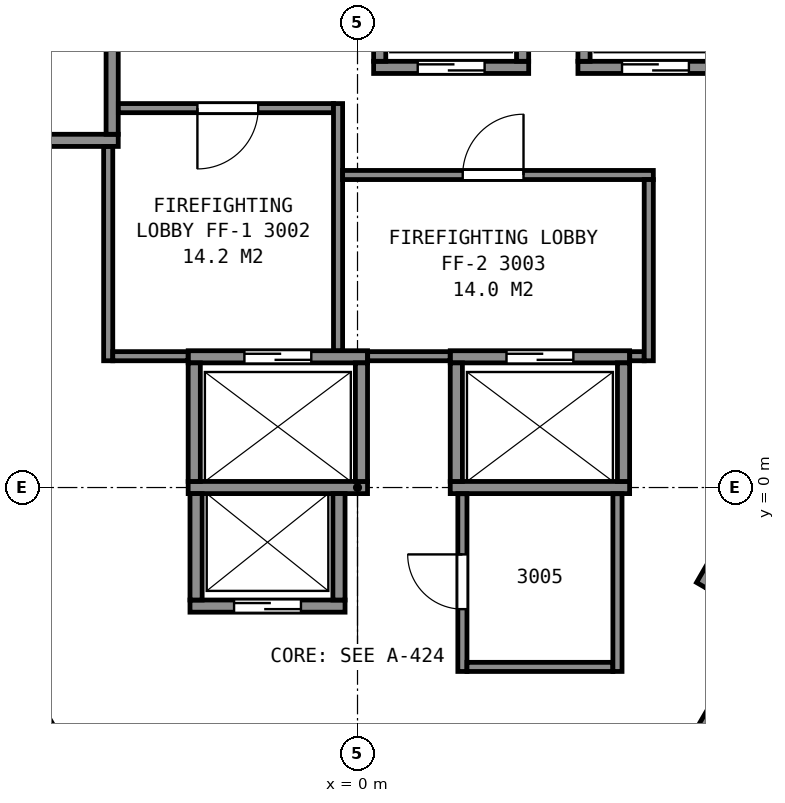
"""IFC4 building model, lengths in metres.
Left out: names, types, materials, properties, quantities, classifications, styles, units other than length and angle.
Written with IfcOpenShell. Run it as: python <this file> out.ifc"""

import sys

from ifc_helpers import new_model, si_unit, direction, frame, frame_2d, origin, place, context, subcontext, project, spatial, rectangle, extrude, element, fill, save


model = new_model("IFC4")
c1 = context("Model", 3, precision=1e-05, world=origin(), true_north=direction((0.0, 1.0)))
c2 = subcontext(c1, "Body", "Model", "MODEL_VIEW")
j1 = project(units=[si_unit("LENGTHUNIT", "METRE"), si_unit("PLANEANGLEUNIT", "RADIAN")], contexts=[c1])
p1 = place(None, origin())
s1 = spatial("IfcSite", under=j1, at=p1, CompositionType="ELEMENT")
p2 = place(p1, origin())
s2 = spatial("IfcBuilding", under=s1, at=p2, CompositionType="ELEMENT")
p3 = place(p2, frame((0.0, 0.0, 125.2)))
s3 = spatial("IfcBuildingStorey", under=s2, at=p3, CompositionType="ELEMENT", Elevation=125.2)
p4 = place(p3, frame((-2.755, -1.95, 0.0), z_axis=(0.0, 0.0, 1.0), x_axis=(1.0, 0.0, 0.0)))
e1 = element("IfcWall", 1, at=p4, inside=s3, PredefinedType="PARTITIONING", context=c2, shape_type="SweptSolid", body=[
    extrude(rectangle(XDim=2.55, YDim=0.2, at=frame_2d((1.275, 0.0))), origin(), (0.0, 0.0, 1.0), 3.6),
])
p5 = place(p4, frame((0.725, 0.0, 0.0)))
e2 = element("IfcOpeningElement", 2, at=p5, cuts=e1, PredefinedType="OPENING", context=c2, shape_type="SweptSolid", body=[
    extrude(rectangle(XDim=1.1, YDim=2.1, at=frame_2d((0.55, 1.05))), frame((0.0, 0.11, 0.0), z_axis=(0.0, -1.0, 0.0), x_axis=(1.0, 0.0, 0.0)), (0.0, 0.0, 1.0), 0.22),
])
p6 = place(p3, frame((-2.785, 0.0, 0.0), z_axis=(0.0, 0.0, 1.0), x_axis=(1.0, 0.0, 0.0)))
e3 = element("IfcWall", 3, at=p6, inside=s3, PredefinedType="PARTITIONING", context=c2, shape_type="SweptSolid", body=[
    extrude(rectangle(XDim=2.95, YDim=0.2, at=frame_2d((1.475, 0.0))), origin(), (0.0, 0.0, 1.0), 3.6),
])
p7 = place(p3, frame((1.525, 0.0, 0.0), z_axis=(0.0, 0.0, 1.0), x_axis=(1.0, 0.0, 0.0)))
e4 = element("IfcWall", 4, at=p7, inside=s3, PredefinedType="PARTITIONING", context=c2, shape_type="SweptSolid", body=[
    extrude(rectangle(XDim=2.95, YDim=0.2, at=frame_2d((1.475, 0.0))), origin(), (0.0, 0.0, 1.0), 3.6),
])
p8 = place(p3, frame((-2.785, 2.15, 0.0), z_axis=(0.0, 0.0, 1.0), x_axis=(1.0, 0.0, 0.0)))
e5 = element("IfcWall", 5, at=p8, inside=s3, PredefinedType="PARTITIONING", context=c2, shape_type="SweptSolid", body=[
    extrude(rectangle(XDim=2.95, YDim=0.2, at=frame_2d((1.475, 0.0))), origin(), (0.0, 0.0, 1.0), 3.6),
])
p9 = place(p8, frame((0.925, 0.0, 0.0)))
e6 = element("IfcOpeningElement", 6, at=p9, cuts=e5, PredefinedType="OPENING", context=c2, shape_type="SweptSolid", body=[
    extrude(rectangle(XDim=1.1, YDim=2.1, at=frame_2d((0.55, 1.05))), frame((0.0, 0.11, 0.0), z_axis=(0.0, -1.0, 0.0), x_axis=(1.0, 0.0, 0.0)), (0.0, 0.0, 1.0), 0.22),
])
p10 = place(p3, frame((1.525, 2.15, 0.0), z_axis=(0.0, 0.0, 1.0), x_axis=(1.0, 0.0, 0.0)))
e7 = element("IfcWall", 7, at=p10, inside=s3, PredefinedType="PARTITIONING", context=c2, shape_type="SweptSolid", body=[
    extrude(rectangle(XDim=2.95, YDim=0.2, at=frame_2d((1.475, 0.0))), origin(), (0.0, 0.0, 1.0), 3.6),
])
p11 = place(p10, frame((0.925, 0.0, 0.0)))
e8 = element("IfcOpeningElement", 8, at=p11, cuts=e7, PredefinedType="OPENING", context=c2, shape_type="SweptSolid", body=[
    extrude(rectangle(XDim=1.1, YDim=2.1, at=frame_2d((0.55, 1.05))), frame((0.0, 0.11, 0.0), z_axis=(0.0, -1.0, 0.0), x_axis=(1.0, 0.0, 0.0)), (0.0, 0.0, 1.0), 0.22),
])
p12 = place(p3, frame((-6.285, 5.71, 0.0), z_axis=(0.0, 0.0, 1.0), x_axis=(1.0, 0.0, 0.0)))
e9 = element("IfcWall", 9, at=p12, inside=s3, PredefinedType="PARTITIONING", context=c2, shape_type="SweptSolid", body=[
    extrude(rectangle(XDim=2.35, YDim=0.2, at=frame_2d((1.175, 0.0))), origin(), (0.0, 0.0, 1.0), 3.6),
])
p13 = place(p3, frame((0.265, 6.91, 0.0), z_axis=(0.0, 0.0, 1.0), x_axis=(1.0, 0.0, 0.0)))
e10 = element("IfcWall", 10, at=p13, inside=s3, PredefinedType="PARTITIONING", context=c2, shape_type="SweptSolid", body=[
    extrude(rectangle(XDim=2.55, YDim=0.2, at=frame_2d((1.275, 0.0))), origin(), (0.0, 0.0, 1.0), 3.6),
])
p14 = place(p13, frame((0.725, 0.0, 0.0)))
e11 = element("IfcOpeningElement", 11, at=p14, cuts=e10, PredefinedType="OPENING", context=c2, shape_type="SweptSolid", body=[
    extrude(rectangle(XDim=1.1, YDim=2.1, at=frame_2d((0.55, 1.05))), frame((0.0, 0.11, 0.0), z_axis=(0.0, -1.0, 0.0), x_axis=(1.0, 0.0, 0.0)), (0.0, 0.0, 1.0), 0.22),
])
p15 = place(p3, frame((3.625, 6.91, 0.0), z_axis=(0.0, 0.0, 1.0), x_axis=(1.0, 0.0, 0.0)))
e12 = element("IfcWall", 12, at=p15, inside=s3, PredefinedType="PARTITIONING", context=c2, shape_type="SweptSolid", body=[
    extrude(rectangle(XDim=2.55, YDim=0.2, at=frame_2d((1.275, 0.0))), origin(), (0.0, 0.0, 1.0), 3.6),
])
p16 = place(p15, frame((0.725, 0.0, 0.0)))
e13 = element("IfcOpeningElement", 13, at=p16, cuts=e12, PredefinedType="OPENING", context=c2, shape_type="SweptSolid", body=[
    extrude(rectangle(XDim=1.1, YDim=2.1, at=frame_2d((0.55, 1.05))), frame((0.0, 0.11, 0.0), z_axis=(0.0, -1.0, 0.0), x_axis=(1.0, 0.0, 0.0)), (0.0, 0.0, 1.0), 0.22),
])
p17 = place(p3, frame((5.527, -4.247, 0.0), z_axis=(0.0, 0.0, 1.0), x_axis=(0.499938297808, 0.866061024631, 0.0)))
e14 = element("IfcWall", 14, at=p17, inside=s3, PredefinedType="PARTITIONING", context=c2, shape_type="SweptSolid", body=[
    extrude(rectangle(XDim=2.35, YDim=0.2, at=frame_2d((1.175, 0.0))), origin(), (0.0, 0.0, 1.0), 3.6),
])
p18 = place(p17, frame((0.725, 0.0, 0.0)))
e15 = element("IfcOpeningElement", 15, at=p18, cuts=e14, PredefinedType="OPENING", context=c2, shape_type="SweptSolid", body=[
    extrude(rectangle(XDim=1.1, YDim=2.1, at=frame_2d((0.55, 1.05))), frame((0.0, 0.11, 0.0), z_axis=(0.0, -1.0, 0.0), x_axis=(1.0, 0.0, 0.0)), (0.0, 0.0, 1.0), 0.22),
])
p19 = place(p3, frame((5.663, -1.612, 0.0), z_axis=(0.0, 0.0, 1.0), x_axis=(0.49998122708, 0.866036242063, 0.0)))
e16 = element("IfcWall", 16, at=p19, inside=s3, PredefinedType="PARTITIONING", context=c2, shape_type="SweptSolid", body=[
    extrude(rectangle(XDim=4.9, YDim=0.2, at=frame_2d((2.45, 0.0))), origin(), (0.0, 0.0, 1.0), 3.6),
])
p20 = place(p3, frame((4.375, 0.1, 0.0), z_axis=(0.0, 0.0, 1.0), x_axis=(0.0, 1.0, 0.0)))
e17 = element("IfcWall", 17, at=p20, inside=s3, PredefinedType="PARTITIONING", context=c2, shape_type="SweptSolid", body=[
    extrude(rectangle(XDim=1.95, YDim=0.2, at=frame_2d((0.975, 0.0))), origin(), (0.0, 0.0, 1.0), 3.6),
])
for number, where, z_axis, x_axis in (
    (18, (3.725, 7.01, 0.0), (0.0, 0.0, 1.0), (0.0, 1.0, 0.0)),
    (19, (2.715, 7.01, 0.0), (0.0, 0.0, 1.0), (0.0, 1.0, 0.0)),
):
    element("IfcWall", number, at=place(p3, frame(where, z_axis=z_axis, x_axis=x_axis)), inside=s3, PredefinedType="PARTITIONING", context=c2, shape_type="SweptSolid", body=[
        extrude(rectangle(XDim=1.75, YDim=0.2, at=frame_2d((0.875, 0.0))), origin(), (0.0, 0.0, 1.0), 3.6),
    ])
p21 = place(p3, frame((1.625, 0.1, 0.0), z_axis=(0.0, 0.0, 1.0), x_axis=(0.0, 1.0, 0.0)))
e20 = element("IfcWall", 20, at=p21, inside=s3, PredefinedType="PARTITIONING", context=c2, shape_type="SweptSolid", body=[
    extrude(rectangle(XDim=1.95, YDim=0.2, at=frame_2d((0.975, 0.0))), origin(), (0.0, 0.0, 1.0), 3.6),
])
p22 = place(p3, frame((0.365, 7.01, 0.0), z_axis=(0.0, 0.0, 1.0), x_axis=(0.0, 1.0, 0.0)))
e21 = element("IfcWall", 21, at=p22, inside=s3, PredefinedType="PARTITIONING", context=c2, shape_type="SweptSolid", body=[
    extrude(rectangle(XDim=1.75, YDim=0.2, at=frame_2d((0.875, 0.0))), origin(), (0.0, 0.0, 1.0), 3.6),
])
p23 = place(p3, frame((0.065, 0.1, 0.0), z_axis=(0.0, 0.0, 1.0), x_axis=(0.0, 1.0, 0.0)))
e22 = element("IfcWall", 22, at=p23, inside=s3, PredefinedType="PARTITIONING", context=c2, shape_type="SweptSolid", body=[
    extrude(rectangle(XDim=1.95, YDim=0.2, at=frame_2d((0.975, 0.0))), origin(), (0.0, 0.0, 1.0), 3.6),
])
for number, where, z_axis, x_axis in (
    (23, (-0.305, -1.85, 0.0), (0.0, 0.0, 1.0), (0.0, 1.0, 0.0)),
    (24, (-2.655, -1.85, 0.0), (0.0, 0.0, 1.0), (0.0, 1.0, 0.0)),
):
    element("IfcWall", number, at=place(p3, frame(where, z_axis=z_axis, x_axis=x_axis)), inside=s3, PredefinedType="PARTITIONING", context=c2, shape_type="SweptSolid", body=[
        extrude(rectangle(XDim=1.75, YDim=0.2, at=frame_2d((0.875, 0.0))), origin(), (0.0, 0.0, 1.0), 3.6),
    ])
p24 = place(p3, frame((-2.685, 0.1, 0.0), z_axis=(0.0, 0.0, 1.0), x_axis=(0.0, 1.0, 0.0)))
e25 = element("IfcWall", 25, at=p24, inside=s3, PredefinedType="PARTITIONING", context=c2, shape_type="SweptSolid", body=[
    extrude(rectangle(XDim=1.95, YDim=0.2, at=frame_2d((0.975, 0.0))), origin(), (0.0, 0.0, 1.0), 3.6),
])
p25 = place(p3, frame((-4.035, 5.81, 0.0), z_axis=(0.0, 0.0, 1.0), x_axis=(0.0, 1.0, 0.0)))
e26 = element("IfcWall", 26, at=p25, inside=s3, PredefinedType="PARTITIONING", context=c2, shape_type="SweptSolid", body=[
    extrude(rectangle(XDim=1.75, YDim=0.2, at=frame_2d((0.875, 0.0))), origin(), (0.0, 0.0, 1.0), 3.6),
])
p26 = place(p3, frame((-13.664, 5.946, 0.0), z_axis=(0.0, 0.0, 1.0), x_axis=(0.499994327219, -0.866028678941, 0.0)))
e27 = element("IfcWall", 27, at=p26, inside=s3, PredefinedType="PARTITIONING", context=c2, shape_type="SweptSolid", body=[
    extrude(rectangle(XDim=23.968, YDim=0.2, at=frame_2d((11.984, 0.0))), origin(), (0.0, 0.0, 1.0), 3.35),
])
p27 = place(p3, frame((-4.091, -5.635, 0.0), z_axis=(0.0, 0.0, 1.0), x_axis=(-0.499948934428, 0.866054884499, 0.0)))
e28 = element("IfcWall", 28, at=p27, inside=s3, PredefinedType="PARTITIONING", context=c2, shape_type="SweptSolid", body=[
    extrude(rectangle(XDim=3.577, YDim=0.15, at=frame_2d((1.789, 0.0))), origin(), (0.0, 0.0, 1.0), 3.35),
])
p28 = place(p27, frame((2.377, 0.0, 0.0)))
e29 = element("IfcOpeningElement", 29, at=p28, cuts=e28, PredefinedType="OPENING", context=c2, shape_type="SweptSolid", body=[
    extrude(rectangle(XDim=0.9, YDim=2.1, at=frame_2d((0.45, 1.05))), frame((0.0, 0.085, 0.0), z_axis=(0.0, -1.0, 0.0), x_axis=(1.0, 0.0, 0.0)), (0.0, 0.0, 1.0), 0.17),
])
p29 = place(p27, frame((0.605, 0.0, 0.0)))
e30 = element("IfcOpeningElement", 30, at=p29, cuts=e28, PredefinedType="OPENING", context=c2, shape_type="SweptSolid", body=[
    extrude(rectangle(XDim=0.9, YDim=2.1, at=frame_2d((0.45, 1.05))), frame((0.0, 0.085, 0.0), z_axis=(0.0, -1.0, 0.0), x_axis=(1.0, 0.0, 0.0)), (0.0, 0.0, 1.0), 0.17),
])
p30 = place(p3, frame((-4.1, 2.085, 0.0), z_axis=(0.0, 0.0, 1.0), x_axis=(0.0, 1.0, 0.0)))
e31 = element("IfcWall", 31, at=p30, inside=s3, PredefinedType="PARTITIONING", context=c2, shape_type="SweptSolid", body=[
    extrude(rectangle(XDim=3.523, YDim=0.15, at=frame_2d((1.761, 0.0))), origin(), (0.0, 0.0, 1.0), 3.35),
])
p31 = place(p3, frame((-4.025, 2.16, 0.0), z_axis=(0.0, 0.0, 1.0), x_axis=(1.0, 0.0, 0.0)))
e32 = element("IfcWall", 32, at=p31, inside=s3, PredefinedType="PARTITIONING", context=c2, shape_type="SweptSolid", body=[
    extrude(rectangle(XDim=1.238, YDim=0.15, at=frame_2d((0.619, 0.0))), origin(), (0.0, 0.0, 1.0), 3.35),
])
p32 = place(p3, frame((-3.933, 6.24, 0.0), z_axis=(0.0, 0.0, 1.0), x_axis=(1.0, 0.0, 0.0)))
e33 = element("IfcWall", 33, at=p32, inside=s3, PredefinedType="PARTITIONING", context=c2, shape_type="SweptSolid", body=[
    extrude(rectangle(XDim=3.538, YDim=0.15, at=frame_2d((1.769, 0.0))), origin(), (0.0, 0.0, 1.0), 3.35),
])
p33 = place(p32, frame((1.3, 0.0, 0.0)))
e34 = element("IfcOpeningElement", 34, at=p33, cuts=e33, PredefinedType="OPENING", context=c2, shape_type="SweptSolid", body=[
    extrude(rectangle(XDim=1.0, YDim=2.1, at=frame_2d((0.5, 1.05))), frame((0.0, 0.085, 0.0), z_axis=(0.0, -1.0, 0.0), x_axis=(1.0, 0.0, 0.0)), (0.0, 0.0, 1.0), 0.17),
])
p34 = place(p3, frame((-0.32, 2.252, 0.0), z_axis=(0.0, 0.0, 1.0), x_axis=(0.0, 1.0, 0.0)))
e35 = element("IfcWall", 35, at=p34, inside=s3, PredefinedType="PARTITIONING", context=c2, shape_type="SweptSolid", body=[
    extrude(rectangle(XDim=4.063, YDim=0.15, at=frame_2d((2.031, 0.0))), origin(), (0.0, 0.0, 1.0), 3.35),
])
p35 = place(p3, frame((-0.245, 5.14, 0.0), z_axis=(0.0, 0.0, 1.0), x_axis=(1.0, 0.0, 0.0)))
e36 = element("IfcWall", 36, at=p35, inside=s3, PredefinedType="PARTITIONING", context=c2, shape_type="SweptSolid", body=[
    extrude(rectangle(XDim=5.11, YDim=0.15, at=frame_2d((2.555, 0.0))), origin(), (0.0, 0.0, 1.0), 3.35),
])
p36 = place(p35, frame((1.975, 0.0, 0.0)))
e37 = element("IfcOpeningElement", 37, at=p36, cuts=e36, PredefinedType="OPENING", context=c2, shape_type="SweptSolid", body=[
    extrude(rectangle(XDim=1.0, YDim=2.1, at=frame_2d((0.5, 1.05))), frame((0.0, 0.085, 0.0), z_axis=(0.0, -1.0, 0.0), x_axis=(1.0, 0.0, 0.0)), (0.0, 0.0, 1.0), 0.17),
])
p37 = place(p3, frame((0.167, 2.16, 0.0), z_axis=(0.0, 0.0, 1.0), x_axis=(1.0, 0.0, 0.0)))
e38 = element("IfcWall", 38, at=p37, inside=s3, PredefinedType="PARTITIONING", context=c2, shape_type="SweptSolid", body=[
    extrude(rectangle(XDim=1.356, YDim=0.15, at=frame_2d((0.678, 0.0))), origin(), (0.0, 0.0, 1.0), 3.35),
])
p38 = place(p3, frame((1.725, -0.102, 0.0), z_axis=(0.0, 0.0, 1.0), x_axis=(0.0, -1.0, 0.0)))
e39 = element("IfcWall", 39, at=p38, inside=s3, PredefinedType="PARTITIONING", context=c2, shape_type="SweptSolid", body=[
    extrude(rectangle(XDim=2.923, YDim=0.15, at=frame_2d((1.461, 0.0))), origin(), (0.0, 0.0, 1.0), 3.35),
])
p39 = place(p38, frame((0.998, 0.0, 0.0)))
e40 = element("IfcOpeningElement", 40, at=p39, cuts=e39, PredefinedType="OPENING", context=c2, shape_type="SweptSolid", body=[
    extrude(rectangle(XDim=0.9, YDim=2.1, at=frame_2d((0.45, 1.05))), frame((0.0, 0.085, 0.0), z_axis=(0.0, -1.0, 0.0), x_axis=(1.0, 0.0, 0.0)), (0.0, 0.0, 1.0), 0.17),
])
p40 = place(p3, frame((1.8, -2.95, 0.0), z_axis=(0.0, 0.0, 1.0), x_axis=(1.0, 0.0, 0.0)))
e41 = element("IfcWall", 41, at=p40, inside=s3, PredefinedType="PARTITIONING", context=c2, shape_type="SweptSolid", body=[
    extrude(rectangle(XDim=2.4, YDim=0.15, at=frame_2d((1.2, 0.0))), origin(), (0.0, 0.0, 1.0), 3.35),
])
p41 = place(p3, frame((4.275, -3.025, 0.0), z_axis=(0.0, 0.0, 1.0), x_axis=(0.0, 1.0, 0.0)))
e42 = element("IfcWall", 42, at=p41, inside=s3, PredefinedType="PARTITIONING", context=c2, shape_type="SweptSolid", body=[
    extrude(rectangle(XDim=2.923, YDim=0.15, at=frame_2d((1.461, 0.0))), origin(), (0.0, 0.0, 1.0), 3.35),
])
p42 = place(p3, frame((4.477, 2.16, 0.0), z_axis=(0.0, 0.0, 1.0), x_axis=(1.0, 0.0, 0.0)))
e43 = element("IfcWall", 43, at=p42, inside=s3, PredefinedType="PARTITIONING", context=c2, shape_type="SweptSolid", body=[
    extrude(rectangle(XDim=0.238, YDim=0.15, at=frame_2d((0.119, 0.0))), origin(), (0.0, 0.0, 1.0), 3.35),
])
p43 = place(p3, frame((4.79, 2.085, 0.0), z_axis=(0.0, 0.0, 1.0), x_axis=(0.0, 1.0, 0.0)))
e44 = element("IfcWall", 44, at=p43, inside=s3, PredefinedType="PARTITIONING", context=c2, shape_type="SweptSolid", body=[
    extrude(rectangle(XDim=2.98, YDim=0.15, at=frame_2d((1.49, 0.0))), origin(), (0.0, 0.0, 1.0), 3.35),
])
p44 = place(p3, frame((-3.756, -15.494, 0.0), z_axis=(0.0, 0.0, 1.0), x_axis=(-0.500027787016, 0.866009360349, 0.0)))
e45 = element("IfcWall", 45, at=p44, inside=s3, PredefinedType="PARTITIONING", context=c2, shape_type="SweptSolid", body=[
    extrude(rectangle(XDim=23.856, YDim=0.125, at=frame_2d((11.928, 0.0))), origin(), (0.0, 0.0, 1.0), 2.613),
])
p45 = place(p44, frame((10.016, 0.0, 0.0)))
e46 = element("IfcOpeningElement", 46, at=p45, cuts=e45, PredefinedType="OPENING", context=c2, shape_type="SweptSolid", body=[
    extrude(rectangle(XDim=1.0, YDim=2.1, at=frame_2d((0.5, 1.05))), frame((0.0, 0.073, 0.0), z_axis=(0.0, -1.0, 0.0), x_axis=(1.0, 0.0, 0.0)), (0.0, 0.0, 1.0), 0.145),
])
p46 = place(p44, frame((6.402, 0.0, 0.0)))
e47 = element("IfcOpeningElement", 47, at=p46, cuts=e45, PredefinedType="OPENING", context=c2, shape_type="SweptSolid", body=[
    extrude(rectangle(XDim=0.9, YDim=2.1, at=frame_2d((0.45, 1.05))), frame((0.0, 0.073, 0.0), z_axis=(0.0, -1.0, 0.0), x_axis=(1.0, 0.0, 0.0)), (0.0, 0.0, 1.0), 0.145),
])
p47 = place(p3, frame((15.684, 5.165, 0.0), z_axis=(0.0, 0.0, 1.0), x_axis=(-0.500027787016, -0.866009360349, 0.0)))
e48 = element("IfcWall", 48, at=p47, inside=s3, PredefinedType="PARTITIONING", context=c2, shape_type="SweptSolid", body=[
    extrude(rectangle(XDim=23.856, YDim=0.125, at=frame_2d((11.928, 0.0))), origin(), (0.0, 0.0, 1.0), 2.613),
])
p48 = place(p47, frame((21.493, 0.0, 0.0)))
e49 = element("IfcOpeningElement", 49, at=p48, cuts=e48, PredefinedType="OPENING", context=c2, shape_type="SweptSolid", body=[
    extrude(rectangle(XDim=1.0, YDim=2.1, at=frame_2d((0.5, 1.05))), frame((0.0, 0.073, 0.0), z_axis=(0.0, -1.0, 0.0), x_axis=(1.0, 0.0, 0.0)), (0.0, 0.0, 1.0), 0.145),
])
p49 = place(p47, frame((10.853, 0.0, 0.0)))
e50 = element("IfcOpeningElement", 50, at=p49, cuts=e48, PredefinedType="OPENING", context=c2, shape_type="SweptSolid", body=[
    extrude(rectangle(XDim=0.9, YDim=2.1, at=frame_2d((0.45, 1.05))), frame((0.0, 0.073, 0.0), z_axis=(0.0, -1.0, 0.0), x_axis=(1.0, 0.0, 0.0)), (0.0, 0.0, 1.0), 0.145),
])
p50 = place(p47, frame((6.558, 0.0, 0.0)))
e51 = element("IfcOpeningElement", 51, at=p50, cuts=e48, PredefinedType="OPENING", context=c2, shape_type="SweptSolid", body=[
    extrude(rectangle(XDim=1.0, YDim=2.1, at=frame_2d((0.5, 1.05))), frame((0.0, 0.073, 0.0), z_axis=(0.0, -1.0, 0.0), x_axis=(1.0, 0.0, 0.0)), (0.0, 0.0, 1.0), 0.145),
])
p51 = place(p14, origin())
e52 = element("IfcDoor", 52, at=p51, inside=s3, OperationType="SLIDING_TO_LEFT", PredefinedType="DOOR", context=c2, shape_type="SweptSolid", body=[
    extrude(rectangle(XDim=1.1, YDim=2.1, at=frame_2d((0.55, 1.05))), frame((0.0, 0.025, 0.0), z_axis=(0.0, -1.0, 0.0), x_axis=(1.0, 0.0, 0.0)), (0.0, 0.0, 1.0), 0.05),
])
fill(e11, e52)
p52 = place(p5, origin())
e53 = element("IfcDoor", 53, at=p52, inside=s3, OperationType="SLIDING_TO_RIGHT", PredefinedType="DOOR", context=c2, shape_type="SweptSolid", body=[
    extrude(rectangle(XDim=1.1, YDim=2.1, at=frame_2d((0.55, 1.05))), frame((0.0, 0.025, 0.0), z_axis=(0.0, -1.0, 0.0), x_axis=(1.0, 0.0, 0.0)), (0.0, 0.0, 1.0), 0.05),
])
fill(e2, e53)
p53 = place(p16, origin())
e54 = element("IfcDoor", 54, at=p53, inside=s3, OperationType="SLIDING_TO_LEFT", PredefinedType="DOOR", context=c2, shape_type="SweptSolid", body=[
    extrude(rectangle(XDim=1.1, YDim=2.1, at=frame_2d((0.55, 1.05))), frame((0.0, 0.025, 0.0), z_axis=(0.0, -1.0, 0.0), x_axis=(1.0, 0.0, 0.0)), (0.0, 0.0, 1.0), 0.05),
])
fill(e13, e54)
p54 = place(p9, origin())
e55 = element("IfcDoor", 55, at=p54, inside=s3, OperationType="SLIDING_TO_LEFT", PredefinedType="DOOR", context=c2, shape_type="SweptSolid", body=[
    extrude(rectangle(XDim=1.1, YDim=2.1, at=frame_2d((0.55, 1.05))), frame((0.0, 0.025, 0.0), z_axis=(0.0, -1.0, 0.0), x_axis=(1.0, 0.0, 0.0)), (0.0, 0.0, 1.0), 0.05),
])
fill(e6, e55)
p55 = place(p11, origin())
e56 = element("IfcDoor", 56, at=p55, inside=s3, OperationType="SLIDING_TO_RIGHT", PredefinedType="DOOR", context=c2, shape_type="SweptSolid", body=[
    extrude(rectangle(XDim=1.1, YDim=2.1, at=frame_2d((0.55, 1.05))), frame((0.0, 0.025, 0.0), z_axis=(0.0, -1.0, 0.0), x_axis=(1.0, 0.0, 0.0)), (0.0, 0.0, 1.0), 0.05),
])
fill(e8, e56)
p56 = place(p33, origin())
e57 = element("IfcDoor", 57, at=p56, inside=s3, OperationType="SINGLE_SWING_LEFT", PredefinedType="DOOR", context=c2, shape_type="SweptSolid", body=[
    extrude(rectangle(XDim=1.0, YDim=2.1, at=frame_2d((0.5, 1.05))), frame((0.0, 0.025, 0.0), z_axis=(0.0, -1.0, 0.0), x_axis=(1.0, 0.0, 0.0)), (0.0, 0.0, 1.0), 0.05),
])
fill(e34, e57)
p57 = place(p36, origin())
e58 = element("IfcDoor", 58, at=p57, inside=s3, OperationType="SINGLE_SWING_RIGHT", PredefinedType="DOOR", context=c2, shape_type="SweptSolid", body=[
    extrude(rectangle(XDim=1.0, YDim=2.1, at=frame_2d((0.5, 1.05))), frame((0.0, 0.025, 0.0), z_axis=(0.0, -1.0, 0.0), x_axis=(1.0, 0.0, 0.0)), (0.0, 0.0, 1.0), 0.05),
])
fill(e37, e58)
p58 = place(p39, origin())
e59 = element("IfcDoor", 59, at=p58, inside=s3, OperationType="SINGLE_SWING_LEFT", PredefinedType="DOOR", context=c2, shape_type="SweptSolid", body=[
    extrude(rectangle(XDim=0.9, YDim=2.1, at=frame_2d((0.45, 1.05))), frame((0.0, 0.025, 0.0), z_axis=(0.0, -1.0, 0.0), x_axis=(1.0, 0.0, 0.0)), (0.0, 0.0, 1.0), 0.05),
])
fill(e40, e59)
save(model, sys.argv[1])
